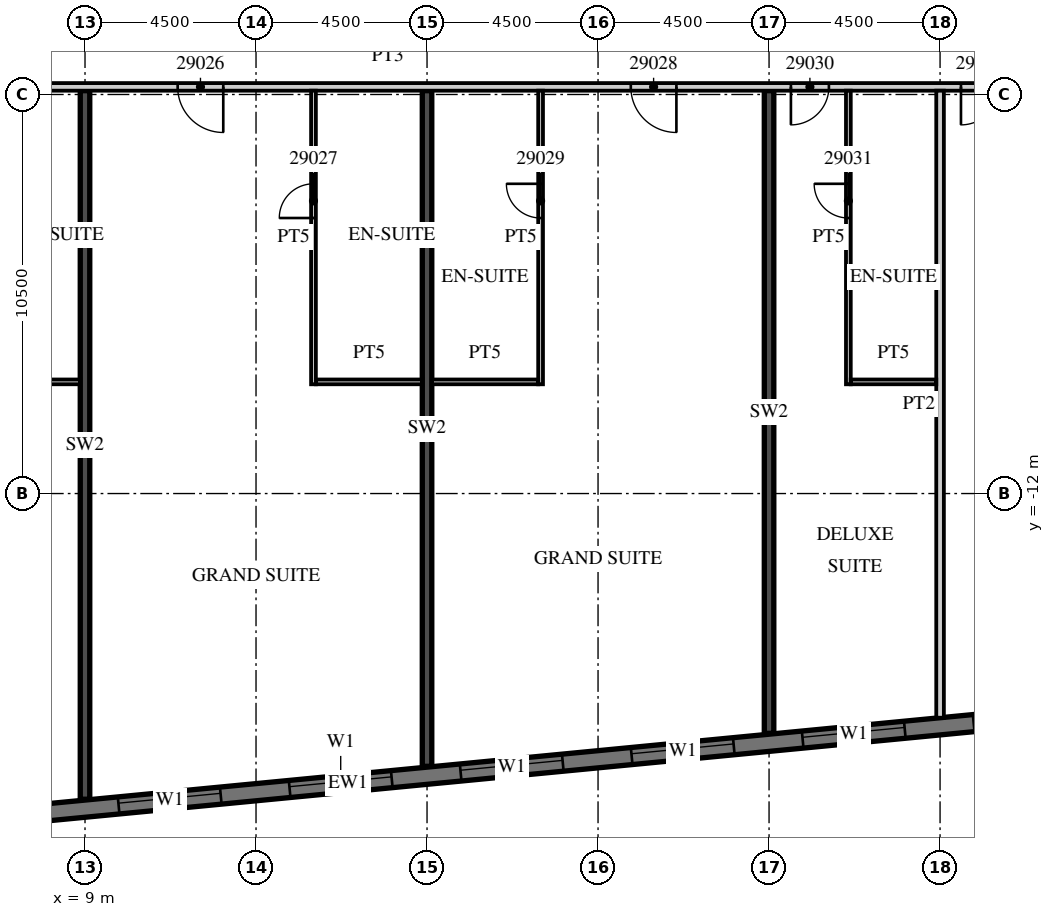
"""IFC4 building model, lengths in metres.
Left out: names, types, materials, properties, quantities, classifications, styles, units other than length and angle.
Written with IfcOpenShell. Run it as: python <this file> out.ifc"""

import sys

from ifc_helpers import new_model, si_unit, direction, frame, frame_2d, origin, place, context, subcontext, project, spatial, rectangle, extrude, element, fill, save


model = new_model("IFC4")
c1 = context("Model", 3, precision=1e-05, world=origin(), true_north=direction((0.0, 1.0)))
c2 = subcontext(c1, "Body", "Model", "MODEL_VIEW")
j1 = project(units=[si_unit("LENGTHUNIT", "METRE"), si_unit("PLANEANGLEUNIT", "RADIAN")], contexts=[c1])
p1 = place(None, origin())
s1 = spatial("IfcSite", under=j1, at=p1, CompositionType="ELEMENT")
p2 = place(p1, origin())
s2 = spatial("IfcBuilding", under=s1, at=p2, CompositionType="ELEMENT")
p3 = place(p2, frame((0.0, 0.0, 130.6)))
s3 = spatial("IfcBuildingStorey", under=s2, at=p3, CompositionType="ELEMENT", Elevation=130.6)
p4 = place(p3, frame((9.0, -20.044, 0.0), z_axis=(0.0, 0.0, 1.0), x_axis=(0.0, 1.0, 0.0)))
e1 = element("IfcWall", 1, at=p4, inside=s3, PredefinedType="SHEAR", context=c2, shape_type="SweptSolid", body=[
    extrude(rectangle(XDim=18.644, YDim=0.25, at=frame_2d((9.322, 0.0))), origin(), (0.0, 0.0, 1.0), 3.3),
])
p5 = place(p3, frame((18.0, -19.177, 0.0), z_axis=(0.0, 0.0, 1.0), x_axis=(0.0, 1.0, 0.0)))
e2 = element("IfcWall", 2, at=p5, inside=s3, PredefinedType="SHEAR", context=c2, shape_type="SweptSolid", body=[
    extrude(rectangle(XDim=17.777, YDim=0.25, at=frame_2d((8.889, 0.0))), origin(), (0.0, 0.0, 1.0), 3.3),
])
p6 = place(p3, frame((27.0, -18.311, 0.0), z_axis=(0.0, 0.0, 1.0), x_axis=(0.0, 1.0, 0.0)))
e3 = element("IfcWall", 3, at=p6, inside=s3, PredefinedType="SHEAR", context=c2, shape_type="SweptSolid", body=[
    extrude(rectangle(XDim=16.911, YDim=0.25, at=frame_2d((8.455, 0.0))), origin(), (0.0, 0.0, 1.0), 3.3),
])
p7 = place(p3, frame((-13.521, -22.46, 0.0), z_axis=(0.0, 0.0, 1.0), x_axis=(0.995396096335, 0.095846812164, 0.0)))
e4 = element("IfcWall", 4, at=p7, inside=s3, PredefinedType="SOLIDWALL", context=c2, shape_type="SweptSolid", body=[
    extrude(rectangle(XDim=59.151, YDim=0.45, at=frame_2d((29.575, 0.0))), origin(), (0.0, 0.0, 1.0), 3.02),
])
p8 = place(p7, frame((0.91, 0.0, 0.45)))
e5 = element("IfcOpeningElement", 5, at=p8, cuts=e4, PredefinedType="OPENING", context=c2, shape_type="SweptSolid", body=[
    extrude(rectangle(XDim=2.7, YDim=2.25, at=frame_2d((1.35, 1.125))), frame((0.0, 0.235, 0.0), z_axis=(0.0, -1.0, 0.0), x_axis=(1.0, 0.0, 0.0)), (0.0, 0.0, 1.0), 0.47),
])
p9 = place(p7, frame((5.431, 0.0, 0.45)))
e6 = element("IfcOpeningElement", 6, at=p9, cuts=e4, PredefinedType="OPENING", context=c2, shape_type="SweptSolid", body=[
    extrude(rectangle(XDim=2.7, YDim=2.25, at=frame_2d((1.35, 1.125))), frame((0.0, 0.235, 0.0), z_axis=(0.0, -1.0, 0.0), x_axis=(1.0, 0.0, 0.0)), (0.0, 0.0, 1.0), 0.47),
])
p10 = place(p7, frame((9.952, 0.0, 0.45)))
e7 = element("IfcOpeningElement", 7, at=p10, cuts=e4, PredefinedType="OPENING", context=c2, shape_type="SweptSolid", body=[
    extrude(rectangle(XDim=2.7, YDim=2.25, at=frame_2d((1.35, 1.125))), frame((0.0, 0.235, 0.0), z_axis=(0.0, -1.0, 0.0), x_axis=(1.0, 0.0, 0.0)), (0.0, 0.0, 1.0), 0.47),
])
p11 = place(p7, frame((14.473, 0.0, 0.45)))
e8 = element("IfcOpeningElement", 8, at=p11, cuts=e4, PredefinedType="OPENING", context=c2, shape_type="SweptSolid", body=[
    extrude(rectangle(XDim=2.7, YDim=2.25, at=frame_2d((1.35, 1.125))), frame((0.0, 0.235, 0.0), z_axis=(0.0, -1.0, 0.0), x_axis=(1.0, 0.0, 0.0)), (0.0, 0.0, 1.0), 0.47),
])
p12 = place(p7, frame((18.994, 0.0, 0.45)))
e9 = element("IfcOpeningElement", 9, at=p12, cuts=e4, PredefinedType="OPENING", context=c2, shape_type="SweptSolid", body=[
    extrude(rectangle(XDim=2.7, YDim=2.25, at=frame_2d((1.35, 1.125))), frame((0.0, 0.235, 0.0), z_axis=(0.0, -1.0, 0.0), x_axis=(1.0, 0.0, 0.0)), (0.0, 0.0, 1.0), 0.47),
])
p13 = place(p7, frame((23.514, 0.0, 0.45)))
e10 = element("IfcOpeningElement", 10, at=p13, cuts=e4, PredefinedType="OPENING", context=c2, shape_type="SweptSolid", body=[
    extrude(rectangle(XDim=2.7, YDim=2.25, at=frame_2d((1.35, 1.125))), frame((0.0, 0.235, 0.0), z_axis=(0.0, -1.0, 0.0), x_axis=(1.0, 0.0, 0.0)), (0.0, 0.0, 1.0), 0.47),
])
p14 = place(p7, frame((28.035, 0.0, 0.45)))
e11 = element("IfcOpeningElement", 11, at=p14, cuts=e4, PredefinedType="OPENING", context=c2, shape_type="SweptSolid", body=[
    extrude(rectangle(XDim=2.7, YDim=2.25, at=frame_2d((1.35, 1.125))), frame((0.0, 0.235, 0.0), z_axis=(0.0, -1.0, 0.0), x_axis=(1.0, 0.0, 0.0)), (0.0, 0.0, 1.0), 0.47),
])
p15 = place(p7, frame((32.556, 0.0, 0.45)))
e12 = element("IfcOpeningElement", 12, at=p15, cuts=e4, PredefinedType="OPENING", context=c2, shape_type="SweptSolid", body=[
    extrude(rectangle(XDim=2.7, YDim=2.25, at=frame_2d((1.35, 1.125))), frame((0.0, 0.235, 0.0), z_axis=(0.0, -1.0, 0.0), x_axis=(1.0, 0.0, 0.0)), (0.0, 0.0, 1.0), 0.47),
])
p16 = place(p7, frame((37.077, 0.0, 0.45)))
e13 = element("IfcOpeningElement", 13, at=p16, cuts=e4, PredefinedType="OPENING", context=c2, shape_type="SweptSolid", body=[
    extrude(rectangle(XDim=2.7, YDim=2.25, at=frame_2d((1.35, 1.125))), frame((0.0, 0.235, 0.0), z_axis=(0.0, -1.0, 0.0), x_axis=(1.0, 0.0, 0.0)), (0.0, 0.0, 1.0), 0.47),
])
p17 = place(p7, frame((41.598, 0.0, 0.45)))
e14 = element("IfcOpeningElement", 14, at=p17, cuts=e4, PredefinedType="OPENING", context=c2, shape_type="SweptSolid", body=[
    extrude(rectangle(XDim=2.7, YDim=2.25, at=frame_2d((1.35, 1.125))), frame((0.0, 0.235, 0.0), z_axis=(0.0, -1.0, 0.0), x_axis=(1.0, 0.0, 0.0)), (0.0, 0.0, 1.0), 0.47),
])
p18 = place(p7, frame((46.118, 0.0, 0.45)))
e15 = element("IfcOpeningElement", 15, at=p18, cuts=e4, PredefinedType="OPENING", context=c2, shape_type="SweptSolid", body=[
    extrude(rectangle(XDim=2.7, YDim=2.25, at=frame_2d((1.35, 1.125))), frame((0.0, 0.235, 0.0), z_axis=(0.0, -1.0, 0.0), x_axis=(1.0, 0.0, 0.0)), (0.0, 0.0, 1.0), 0.47),
])
p19 = place(p7, frame((50.639, 0.0, 0.45)))
e16 = element("IfcOpeningElement", 16, at=p19, cuts=e4, PredefinedType="OPENING", context=c2, shape_type="SweptSolid", body=[
    extrude(rectangle(XDim=2.7, YDim=2.25, at=frame_2d((1.35, 1.125))), frame((0.0, 0.235, 0.0), z_axis=(0.0, -1.0, 0.0), x_axis=(1.0, 0.0, 0.0)), (0.0, 0.0, 1.0), 0.47),
])
p20 = place(p7, frame((55.15, 0.0, 0.45)))
e17 = element("IfcOpeningElement", 17, at=p20, cuts=e4, PredefinedType="OPENING", context=c2, shape_type="SweptSolid", body=[
    extrude(rectangle(XDim=2.7, YDim=2.25, at=frame_2d((1.35, 1.125))), frame((0.0, 0.235, 0.0), z_axis=(0.0, -1.0, 0.0), x_axis=(1.0, 0.0, 0.0)), (0.0, 0.0, 1.0), 0.47),
])
p21 = place(p3, frame((-13.5, -1.3, 0.0), z_axis=(0.0, 0.0, 1.0), x_axis=(1.0, 0.0, 0.0)))
e18 = element("IfcWall", 18, at=p21, inside=s3, PredefinedType="PARTITIONING", context=c2, shape_type="SweptSolid", body=[
    extrude(rectangle(XDim=60.932, YDim=0.2, at=frame_2d((30.466, 0.0))), origin(), (0.0, 0.0, 1.0), 3.02),
])
p22 = place(p21, frame((2.925, 0.0, 0.0)))
e19 = element("IfcOpeningElement", 19, at=p22, cuts=e18, PredefinedType="OPENING", context=c2, shape_type="SweptSolid", body=[
    extrude(rectangle(XDim=1.0, YDim=2.1, at=frame_2d((0.5, 1.05))), frame((0.0, 0.11, 0.0), z_axis=(0.0, -1.0, 0.0), x_axis=(1.0, 0.0, 0.0)), (0.0, 0.0, 1.0), 0.22),
])
p23 = place(p21, frame((9.863, 0.0, 0.0)))
e20 = element("IfcOpeningElement", 20, at=p23, cuts=e18, PredefinedType="OPENING", context=c2, shape_type="SweptSolid", body=[
    extrude(rectangle(XDim=1.2, YDim=2.1, at=frame_2d((0.6, 1.05))), frame((0.0, 0.11, 0.0), z_axis=(0.0, -1.0, 0.0), x_axis=(1.0, 0.0, 0.0)), (0.0, 0.0, 1.0), 0.22),
])
p24 = place(p21, frame((14.075, 0.0, 0.0)))
e21 = element("IfcOpeningElement", 21, at=p24, cuts=e18, PredefinedType="OPENING", context=c2, shape_type="SweptSolid", body=[
    extrude(rectangle(XDim=1.0, YDim=2.1, at=frame_2d((0.5, 1.05))), frame((0.0, 0.11, 0.0), z_axis=(0.0, -1.0, 0.0), x_axis=(1.0, 0.0, 0.0)), (0.0, 0.0, 1.0), 0.22),
])
p25 = place(p21, frame((18.55, 0.0, 0.0)))
e22 = element("IfcOpeningElement", 22, at=p25, cuts=e18, PredefinedType="OPENING", context=c2, shape_type="SweptSolid", body=[
    extrude(rectangle(XDim=1.0, YDim=2.1, at=frame_2d((0.5, 1.05))), frame((0.0, 0.11, 0.0), z_axis=(0.0, -1.0, 0.0), x_axis=(1.0, 0.0, 0.0)), (0.0, 0.0, 1.0), 0.22),
])
p26 = place(p21, frame((24.938, 0.0, 0.0)))
e23 = element("IfcOpeningElement", 23, at=p26, cuts=e18, PredefinedType="OPENING", context=c2, shape_type="SweptSolid", body=[
    extrude(rectangle(XDim=1.2, YDim=2.1, at=frame_2d((0.6, 1.05))), frame((0.0, 0.11, 0.0), z_axis=(0.0, -1.0, 0.0), x_axis=(1.0, 0.0, 0.0)), (0.0, 0.0, 1.0), 0.22),
])
p27 = place(p21, frame((36.862, 0.0, 0.0)))
e24 = element("IfcOpeningElement", 24, at=p27, cuts=e18, PredefinedType="OPENING", context=c2, shape_type="SweptSolid", body=[
    extrude(rectangle(XDim=1.2, YDim=2.1, at=frame_2d((0.6, 1.05))), frame((0.0, 0.11, 0.0), z_axis=(0.0, -1.0, 0.0), x_axis=(1.0, 0.0, 0.0)), (0.0, 0.0, 1.0), 0.22),
])
p28 = place(p21, frame((41.075, 0.0, 0.0)))
e25 = element("IfcOpeningElement", 25, at=p28, cuts=e18, PredefinedType="OPENING", context=c2, shape_type="SweptSolid", body=[
    extrude(rectangle(XDim=1.0, YDim=2.1, at=frame_2d((0.5, 1.05))), frame((0.0, 0.11, 0.0), z_axis=(0.0, -1.0, 0.0), x_axis=(1.0, 0.0, 0.0)), (0.0, 0.0, 1.0), 0.22),
])
p29 = place(p21, frame((45.55, 0.0, 0.0)))
e26 = element("IfcOpeningElement", 26, at=p29, cuts=e18, PredefinedType="OPENING", context=c2, shape_type="SweptSolid", body=[
    extrude(rectangle(XDim=1.0, YDim=2.1, at=frame_2d((0.5, 1.05))), frame((0.0, 0.11, 0.0), z_axis=(0.0, -1.0, 0.0), x_axis=(1.0, 0.0, 0.0)), (0.0, 0.0, 1.0), 0.22),
])
p30 = place(p21, frame((52.425, 0.0, 0.0)))
e27 = element("IfcOpeningElement", 27, at=p30, cuts=e18, PredefinedType="OPENING", context=c2, shape_type="SweptSolid", body=[
    extrude(rectangle(XDim=1.0, YDim=2.1, at=frame_2d((0.5, 1.05))), frame((0.0, 0.11, 0.0), z_axis=(0.0, -1.0, 0.0), x_axis=(1.0, 0.0, 0.0)), (0.0, 0.0, 1.0), 0.22),
])
p31 = place(p21, frame((56.95, 0.0, 0.0)))
e28 = element("IfcOpeningElement", 28, at=p31, cuts=e18, PredefinedType="OPENING", context=c2, shape_type="SweptSolid", body=[
    extrude(rectangle(XDim=1.0, YDim=2.1, at=frame_2d((0.5, 1.05))), frame((0.0, 0.11, 0.0), z_axis=(0.0, -1.0, 0.0), x_axis=(1.0, 0.0, 0.0)), (0.0, 0.0, 1.0), 0.22),
])
p32 = place(p21, frame((59.882, 0.0, 0.0)))
e29 = element("IfcOpeningElement", 29, at=p32, cuts=e18, PredefinedType="OPENING", context=c2, shape_type="SweptSolid", body=[
    extrude(rectangle(XDim=0.9, YDim=2.1, at=frame_2d((0.45, 1.05))), frame((0.0, 0.11, 0.0), z_axis=(0.0, -1.0, 0.0), x_axis=(1.0, 0.0, 0.0)), (0.0, 0.0, 1.0), 0.22),
])
p33 = place(p3, frame((6.625, -9.062, 0.0), z_axis=(0.0, 0.0, 1.0), x_axis=(1.0, 0.0, 0.0)))
e30 = element("IfcWall", 30, at=p33, inside=s3, PredefinedType="PARTITIONING", context=c2, shape_type="SweptSolid", body=[
    extrude(rectangle(XDim=2.25, YDim=0.125, at=frame_2d((1.125, 0.0))), origin(), (0.0, 0.0, 1.0), 3.02),
])
p34 = place(p3, frame((15.012, -9.125, 0.0), z_axis=(0.0, 0.0, 1.0), x_axis=(0.0, 1.0, 0.0)))
e31 = element("IfcWall", 31, at=p34, inside=s3, PredefinedType="PARTITIONING", context=c2, shape_type="SweptSolid", body=[
    extrude(rectangle(XDim=7.725, YDim=0.125, at=frame_2d((3.863, 0.0))), origin(), (0.0, 0.0, 1.0), 3.02),
])
p35 = place(p34, frame((4.375, 0.0, 0.0)))
e32 = element("IfcOpeningElement", 32, at=p35, cuts=e31, PredefinedType="OPENING", context=c2, shape_type="SweptSolid", body=[
    extrude(rectangle(XDim=0.9, YDim=2.1, at=frame_2d((0.45, 1.05))), frame((0.0, 0.073, 0.0), z_axis=(0.0, -1.0, 0.0), x_axis=(1.0, 0.0, 0.0)), (0.0, 0.0, 1.0), 0.145),
])
p36 = place(p3, frame((15.075, -9.062, 0.0), z_axis=(0.0, 0.0, 1.0), x_axis=(1.0, 0.0, 0.0)))
e33 = element("IfcWall", 33, at=p36, inside=s3, PredefinedType="PARTITIONING", context=c2, shape_type="SweptSolid", body=[
    extrude(rectangle(XDim=2.8, YDim=0.125, at=frame_2d((1.4, 0.0))), origin(), (0.0, 0.0, 1.0), 3.02),
])
p37 = place(p3, frame((20.988, -9.125, 0.0), z_axis=(0.0, 0.0, 1.0), x_axis=(0.0, 1.0, 0.0)))
e34 = element("IfcWall", 34, at=p37, inside=s3, PredefinedType="PARTITIONING", context=c2, shape_type="SweptSolid", body=[
    extrude(rectangle(XDim=7.725, YDim=0.125, at=frame_2d((3.863, 0.0))), origin(), (0.0, 0.0, 1.0), 3.02),
])
p38 = place(p37, frame((4.375, 0.0, 0.0)))
e35 = element("IfcOpeningElement", 35, at=p38, cuts=e34, PredefinedType="OPENING", context=c2, shape_type="SweptSolid", body=[
    extrude(rectangle(XDim=0.9, YDim=2.1, at=frame_2d((0.45, 1.05))), frame((0.0, 0.073, 0.0), z_axis=(0.0, -1.0, 0.0), x_axis=(1.0, 0.0, 0.0)), (0.0, 0.0, 1.0), 0.145),
])
p39 = place(p3, frame((18.125, -9.062, 0.0), z_axis=(0.0, 0.0, 1.0), x_axis=(1.0, 0.0, 0.0)))
e36 = element("IfcWall", 36, at=p39, inside=s3, PredefinedType="PARTITIONING", context=c2, shape_type="SweptSolid", body=[
    extrude(rectangle(XDim=2.8, YDim=0.125, at=frame_2d((1.4, 0.0))), origin(), (0.0, 0.0, 1.0), 3.02),
])
p40 = place(p3, frame((31.5, -17.899, 0.0), z_axis=(0.0, 0.0, 1.0), x_axis=(0.0, 1.0, 0.0)))
e37 = element("IfcWall", 37, at=p40, inside=s3, PredefinedType="PARTITIONING", context=c2, shape_type="SweptSolid", body=[
    extrude(rectangle(XDim=16.499, YDim=0.2, at=frame_2d((8.25, 0.0))), origin(), (0.0, 0.0, 1.0), 3.02),
])
p41 = place(p3, frame((29.087, -9.125, 0.0), z_axis=(0.0, 0.0, 1.0), x_axis=(0.0, 1.0, 0.0)))
e38 = element("IfcWall", 38, at=p41, inside=s3, PredefinedType="PARTITIONING", context=c2, shape_type="SweptSolid", body=[
    extrude(rectangle(XDim=7.725, YDim=0.125, at=frame_2d((3.863, 0.0))), origin(), (0.0, 0.0, 1.0), 3.02),
])
p42 = place(p41, frame((4.375, 0.0, 0.0)))
e39 = element("IfcOpeningElement", 39, at=p42, cuts=e38, PredefinedType="OPENING", context=c2, shape_type="SweptSolid", body=[
    extrude(rectangle(XDim=0.9, YDim=2.1, at=frame_2d((0.45, 1.05))), frame((0.0, 0.073, 0.0), z_axis=(0.0, -1.0, 0.0), x_axis=(1.0, 0.0, 0.0)), (0.0, 0.0, 1.0), 0.145),
])
p43 = place(p3, frame((29.15, -9.062, 0.0), z_axis=(0.0, 0.0, 1.0), x_axis=(1.0, 0.0, 0.0)))
e40 = element("IfcWall", 40, at=p43, inside=s3, PredefinedType="PARTITIONING", context=c2, shape_type="SweptSolid", body=[
    extrude(rectangle(XDim=2.25, YDim=0.125, at=frame_2d((1.125, 0.0))), origin(), (0.0, 0.0, 1.0), 3.02),
])
p44 = place(p13, origin())
e41 = element("IfcWindow", 41, at=p44, inside=s3, PartitioningType="SINGLE_PANEL", PredefinedType="WINDOW", context=c2, shape_type="SweptSolid", body=[
    extrude(rectangle(XDim=2.7, YDim=2.25, at=frame_2d((1.35, 1.125))), frame((0.0, 0.09, 0.0), z_axis=(0.0, -1.0, 0.0), x_axis=(1.0, 0.0, 0.0)), (0.0, 0.0, 1.0), 0.06),
])
fill(e10, e41)
p45 = place(p14, origin())
e42 = element("IfcWindow", 42, at=p45, inside=s3, PartitioningType="SINGLE_PANEL", PredefinedType="WINDOW", context=c2, shape_type="SweptSolid", body=[
    extrude(rectangle(XDim=2.7, YDim=2.25, at=frame_2d((1.35, 1.125))), frame((0.0, 0.09, 0.0), z_axis=(0.0, -1.0, 0.0), x_axis=(1.0, 0.0, 0.0)), (0.0, 0.0, 1.0), 0.06),
])
fill(e11, e42)
p46 = place(p15, origin())
e43 = element("IfcWindow", 43, at=p46, inside=s3, PartitioningType="SINGLE_PANEL", PredefinedType="WINDOW", context=c2, shape_type="SweptSolid", body=[
    extrude(rectangle(XDim=2.7, YDim=2.25, at=frame_2d((1.35, 1.125))), frame((0.0, 0.09, 0.0), z_axis=(0.0, -1.0, 0.0), x_axis=(1.0, 0.0, 0.0)), (0.0, 0.0, 1.0), 0.06),
])
fill(e12, e43)
p47 = place(p16, origin())
e44 = element("IfcWindow", 44, at=p47, inside=s3, PartitioningType="SINGLE_PANEL", PredefinedType="WINDOW", context=c2, shape_type="SweptSolid", body=[
    extrude(rectangle(XDim=2.7, YDim=2.25, at=frame_2d((1.35, 1.125))), frame((0.0, 0.09, 0.0), z_axis=(0.0, -1.0, 0.0), x_axis=(1.0, 0.0, 0.0)), (0.0, 0.0, 1.0), 0.06),
])
fill(e13, e44)
p48 = place(p17, origin())
e45 = element("IfcWindow", 45, at=p48, inside=s3, PartitioningType="SINGLE_PANEL", PredefinedType="WINDOW", context=c2, shape_type="SweptSolid", body=[
    extrude(rectangle(XDim=2.7, YDim=2.25, at=frame_2d((1.35, 1.125))), frame((0.0, 0.09, 0.0), z_axis=(0.0, -1.0, 0.0), x_axis=(1.0, 0.0, 0.0)), (0.0, 0.0, 1.0), 0.06),
])
fill(e14, e45)
p49 = place(p18, origin())
e46 = element("IfcWindow", 46, at=p49, inside=s3, PartitioningType="SINGLE_PANEL", PredefinedType="WINDOW", context=c2, shape_type="SweptSolid", body=[
    extrude(rectangle(XDim=2.7, YDim=2.25, at=frame_2d((1.35, 1.125))), frame((0.0, 0.09, 0.0), z_axis=(0.0, -1.0, 0.0), x_axis=(1.0, 0.0, 0.0)), (0.0, 0.0, 1.0), 0.06),
])
fill(e15, e46)
p50 = place(p26, origin())
e47 = element("IfcDoor", 47, at=p50, inside=s3, OperationType="SINGLE_SWING_RIGHT", PredefinedType="DOOR", context=c2, shape_type="SweptSolid", body=[
    extrude(rectangle(XDim=1.2, YDim=2.1, at=frame_2d((0.6, 1.05))), frame((0.0, 0.025, 0.0), z_axis=(0.0, -1.0, 0.0), x_axis=(1.0, 0.0, 0.0)), (0.0, 0.0, 1.0), 0.05),
])
fill(e23, e47)
p51 = place(p35, origin())
e48 = element("IfcDoor", 48, at=p51, inside=s3, OperationType="SINGLE_SWING_LEFT", PredefinedType="DOOR", context=c2, shape_type="SweptSolid", body=[
    extrude(rectangle(XDim=0.9, YDim=2.1, at=frame_2d((0.45, 1.05))), frame((0.0, 0.025, 0.0), z_axis=(0.0, -1.0, 0.0), x_axis=(1.0, 0.0, 0.0)), (0.0, 0.0, 1.0), 0.05),
])
fill(e32, e48)
p52 = place(p27, origin())
e49 = element("IfcDoor", 49, at=p52, inside=s3, OperationType="SINGLE_SWING_RIGHT", PredefinedType="DOOR", context=c2, shape_type="SweptSolid", body=[
    extrude(rectangle(XDim=1.2, YDim=2.1, at=frame_2d((0.6, 1.05))), frame((0.0, 0.025, 0.0), z_axis=(0.0, -1.0, 0.0), x_axis=(1.0, 0.0, 0.0)), (0.0, 0.0, 1.0), 0.05),
])
fill(e24, e49)
p53 = place(p38, origin())
e50 = element("IfcDoor", 50, at=p53, inside=s3, OperationType="SINGLE_SWING_RIGHT", PredefinedType="DOOR", context=c2, shape_type="SweptSolid", body=[
    extrude(rectangle(XDim=0.9, YDim=2.1, at=frame_2d((0.45, 1.05))), frame((0.0, 0.025, 0.0), z_axis=(0.0, -1.0, 0.0), x_axis=(1.0, 0.0, 0.0)), (0.0, 0.0, 1.0), 0.05),
])
fill(e35, e50)
p54 = place(p28, origin())
e51 = element("IfcDoor", 51, at=p54, inside=s3, OperationType="SINGLE_SWING_LEFT", PredefinedType="DOOR", context=c2, shape_type="SweptSolid", body=[
    extrude(rectangle(XDim=1.0, YDim=2.1, at=frame_2d((0.5, 1.05))), frame((0.0, 0.025, 0.0), z_axis=(0.0, -1.0, 0.0), x_axis=(1.0, 0.0, 0.0)), (0.0, 0.0, 1.0), 0.05),
])
fill(e25, e51)
p55 = place(p42, origin())
e52 = element("IfcDoor", 52, at=p55, inside=s3, OperationType="SINGLE_SWING_RIGHT", PredefinedType="DOOR", context=c2, shape_type="SweptSolid", body=[
    extrude(rectangle(XDim=0.9, YDim=2.1, at=frame_2d((0.45, 1.05))), frame((0.0, 0.025, 0.0), z_axis=(0.0, -1.0, 0.0), x_axis=(1.0, 0.0, 0.0)), (0.0, 0.0, 1.0), 0.05),
])
fill(e39, e52)
p56 = place(p29, origin())
e53 = element("IfcDoor", 53, at=p56, inside=s3, OperationType="SINGLE_SWING_LEFT", PredefinedType="DOOR", context=c2, shape_type="SweptSolid", body=[
    extrude(rectangle(XDim=1.0, YDim=2.1, at=frame_2d((0.5, 1.05))), frame((0.0, 0.025, 0.0), z_axis=(0.0, -1.0, 0.0), x_axis=(1.0, 0.0, 0.0)), (0.0, 0.0, 1.0), 0.05),
])
fill(e26, e53)
save(model, sys.argv[1])
